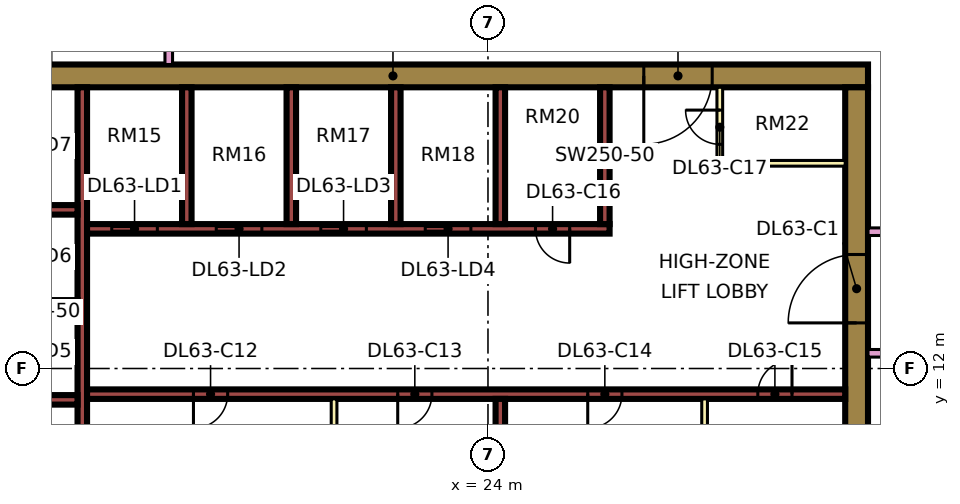
"""IFC4 building model, lengths in metres.
Left out: names, types, materials, properties, quantities, classifications, styles, units other than length and angle.
Written with IfcOpenShell. Run it as: python <this file> out.ifc"""

import sys

from ifc_helpers import new_model, si_unit, direction, frame, frame_2d, origin, place, context, subcontext, project, spatial, rectangle, extrude, element, fill, save


model = new_model("IFC4")
c1 = context("Model", 3, precision=1e-05, world=origin(), true_north=direction((0.0, 1.0)))
c2 = subcontext(c1, "Body", "Model", "MODEL_VIEW")
j1 = project(units=[si_unit("LENGTHUNIT", "METRE"), si_unit("PLANEANGLEUNIT", "RADIAN")], contexts=[c1])
p1 = place(None, origin())
s1 = spatial("IfcSite", under=j1, at=p1, CompositionType="ELEMENT")
p2 = place(p1, origin())
s2 = spatial("IfcBuilding", under=s1, at=p2, CompositionType="ELEMENT")
p3 = place(p2, frame((0.0, 0.0, 273.4)))
s3 = spatial("IfcBuildingStorey", under=s2, at=p3, CompositionType="ELEMENT", Elevation=273.4)
p4 = place(p3, frame((9.0, 19.7, 0.0), z_axis=(0.0, 0.0, 1.0), x_axis=(1.0, 0.0, 0.0)))
e1 = element("IfcWall", 1, at=p4, inside=s3, PredefinedType="SHEAR", context=c2, shape_type="SweptSolid", body=[
    extrude(rectangle(XDim=25.0, YDim=0.6, at=frame_2d((12.5, 0.0))), origin(), (0.0, 0.0, 1.0), 3.75),
])
p5 = place(p4, frame((19.1, 0.0, 0.0)))
e2 = element("IfcOpeningElement", 2, at=p5, cuts=e1, PredefinedType="OPENING", context=c2, shape_type="SweptSolid", body=[
    extrude(rectangle(XDim=1.8, YDim=2.4, at=frame_2d((0.9, 1.2))), frame((0.0, 0.31, 0.0), z_axis=(0.0, -1.0, 0.0), x_axis=(1.0, 0.0, 0.0)), (0.0, 0.0, 1.0), 0.62),
])
p6 = place(p3, frame((33.7, 7.6, 0.0), z_axis=(0.0, 0.0, 1.0), x_axis=(0.0, 1.0, 0.0)))
e3 = element("IfcWall", 3, at=p6, inside=s3, PredefinedType="SHEAR", context=c2, shape_type="SweptSolid", body=[
    extrude(rectangle(XDim=11.8, YDim=0.6, at=frame_2d((5.9, 0.0))), origin(), (0.0, 0.0, 1.0), 3.75),
])
p7 = place(p6, frame((5.6, 0.0, 0.0)))
e4 = element("IfcOpeningElement", 4, at=p7, cuts=e3, PredefinedType="OPENING", context=c2, shape_type="SweptSolid", body=[
    extrude(rectangle(XDim=1.8, YDim=2.4, at=frame_2d((0.9, 1.2))), frame((0.0, 0.31, 0.0), z_axis=(0.0, -1.0, 0.0), x_axis=(1.0, 0.0, 0.0)), (0.0, 0.0, 1.0), 0.62),
])
p8 = place(p3, frame((13.325, 7.6, 0.0), z_axis=(0.0, 0.0, 1.0), x_axis=(0.0, 1.0, 0.0)))
e5 = element("IfcWall", 5, at=p8, inside=s3, PredefinedType="SHEAR", context=c2, shape_type="SweptSolid", body=[
    extrude(rectangle(XDim=11.8, YDim=0.25, at=frame_2d((5.9, 0.0))), origin(), (0.0, 0.0, 1.0), 3.75),
])
p9 = place(p3, frame((13.45, 11.325, 0.0), z_axis=(0.0, 0.0, 1.0), x_axis=(1.0, 0.0, 0.0)))
e6 = element("IfcWall", 6, at=p9, inside=s3, PredefinedType="SHEAR", context=c2, shape_type="SweptSolid", body=[
    extrude(rectangle(XDim=19.95, YDim=0.25, at=frame_2d((9.975, 0.0))), origin(), (0.0, 0.0, 1.0), 3.75),
])
p10 = place(p9, frame((2.8, 0.0, 0.0)))
e7 = element("IfcOpeningElement", 7, at=p10, cuts=e6, PredefinedType="OPENING", context=c2, shape_type="SweptSolid", body=[
    extrude(rectangle(XDim=0.9, YDim=2.1, at=frame_2d((0.45, 1.05))), frame((0.0, 0.135, 0.0), z_axis=(0.0, -1.0, 0.0), x_axis=(1.0, 0.0, 0.0)), (0.0, 0.0, 1.0), 0.27),
])
p11 = place(p9, frame((8.175, 0.0, 0.0)))
e8 = element("IfcOpeningElement", 8, at=p11, cuts=e6, PredefinedType="OPENING", context=c2, shape_type="SweptSolid", body=[
    extrude(rectangle(XDim=0.9, YDim=2.1, at=frame_2d((0.45, 1.05))), frame((0.0, 0.135, 0.0), z_axis=(0.0, -1.0, 0.0), x_axis=(1.0, 0.0, 0.0)), (0.0, 0.0, 1.0), 0.27),
])
p12 = place(p9, frame((13.175, 0.0, 0.0)))
e9 = element("IfcOpeningElement", 9, at=p12, cuts=e6, PredefinedType="OPENING", context=c2, shape_type="SweptSolid", body=[
    extrude(rectangle(XDim=0.9, YDim=2.1, at=frame_2d((0.45, 1.05))), frame((0.0, 0.135, 0.0), z_axis=(0.0, -1.0, 0.0), x_axis=(1.0, 0.0, 0.0)), (0.0, 0.0, 1.0), 0.27),
])
p13 = place(p9, frame((17.65, 0.0, 0.0)))
e10 = element("IfcOpeningElement", 10, at=p13, cuts=e6, PredefinedType="OPENING", context=c2, shape_type="SweptSolid", body=[
    extrude(rectangle(XDim=0.9, YDim=2.1, at=frame_2d((0.45, 1.05))), frame((0.0, 0.135, 0.0), z_axis=(0.0, -1.0, 0.0), x_axis=(1.0, 0.0, 0.0)), (0.0, 0.0, 1.0), 0.27),
])
p14 = place(p3, frame((13.45, 15.675, 0.0), z_axis=(0.0, 0.0, 1.0), x_axis=(1.0, 0.0, 0.0)))
e11 = element("IfcWall", 11, at=p14, inside=s3, PredefinedType="SHEAR", context=c2, shape_type="SweptSolid", body=[
    extrude(rectangle(XDim=13.75, YDim=0.25, at=frame_2d((6.875, 0.0))), origin(), (0.0, 0.0, 1.0), 3.75),
])
p15 = place(p14, frame((0.65, 0.0, 0.0)))
e12 = element("IfcOpeningElement", 12, at=p15, cuts=e11, PredefinedType="OPENING", context=c2, shape_type="SweptSolid", body=[
    extrude(rectangle(XDim=1.2, YDim=2.2, at=frame_2d((0.6, 1.1))), frame((0.0, 0.135, 0.0), z_axis=(0.0, -1.0, 0.0), x_axis=(1.0, 0.0, 0.0)), (0.0, 0.0, 1.0), 0.27),
])
p16 = place(p14, frame((3.4, 0.0, 0.0)))
e13 = element("IfcOpeningElement", 13, at=p16, cuts=e11, PredefinedType="OPENING", context=c2, shape_type="SweptSolid", body=[
    extrude(rectangle(XDim=1.2, YDim=2.2, at=frame_2d((0.6, 1.1))), frame((0.0, 0.135, 0.0), z_axis=(0.0, -1.0, 0.0), x_axis=(1.0, 0.0, 0.0)), (0.0, 0.0, 1.0), 0.27),
])
p17 = place(p14, frame((6.15, 0.0, 0.0)))
e14 = element("IfcOpeningElement", 14, at=p17, cuts=e11, PredefinedType="OPENING", context=c2, shape_type="SweptSolid", body=[
    extrude(rectangle(XDim=1.2, YDim=2.2, at=frame_2d((0.6, 1.1))), frame((0.0, 0.135, 0.0), z_axis=(0.0, -1.0, 0.0), x_axis=(1.0, 0.0, 0.0)), (0.0, 0.0, 1.0), 0.27),
])
p18 = place(p14, frame((8.9, 0.0, 0.0)))
e15 = element("IfcOpeningElement", 15, at=p18, cuts=e11, PredefinedType="OPENING", context=c2, shape_type="SweptSolid", body=[
    extrude(rectangle(XDim=1.2, YDim=2.2, at=frame_2d((0.6, 1.1))), frame((0.0, 0.135, 0.0), z_axis=(0.0, -1.0, 0.0), x_axis=(1.0, 0.0, 0.0)), (0.0, 0.0, 1.0), 0.27),
])
p19 = place(p14, frame((11.8, 0.0, 0.0)))
e16 = element("IfcOpeningElement", 16, at=p19, cuts=e11, PredefinedType="OPENING", context=c2, shape_type="SweptSolid", body=[
    extrude(rectangle(XDim=0.9, YDim=2.1, at=frame_2d((0.45, 1.05))), frame((0.0, 0.135, 0.0), z_axis=(0.0, -1.0, 0.0), x_axis=(1.0, 0.0, 0.0)), (0.0, 0.0, 1.0), 0.27),
])
for number, where, z_axis, x_axis in (
    (17, (10.2, 11.175, 0.0), (0.0, 0.0, 1.0), (1.0, 0.0, 0.0)),
    (18, (10.2, 13.675, 0.0), (0.0, 0.0, 1.0), (1.0, 0.0, 0.0)),
    (19, (10.2, 16.175, 0.0), (0.0, 0.0, 1.0), (1.0, 0.0, 0.0)),
):
    element("IfcWall", number, at=place(p3, frame(where, z_axis=z_axis, x_axis=x_axis)), inside=s3, PredefinedType="SHEAR", context=c2, shape_type="SweptSolid", body=[
        extrude(rectangle(XDim=3.0, YDim=0.25, at=frame_2d((1.5, 0.0))), origin(), (0.0, 0.0, 1.0), 3.75),
    ])
for number, where, z_axis, x_axis in (
    (20, (24.325, 7.6, 0.0), (0.0, 0.0, 1.0), (0.0, 1.0, 0.0)),
    (21, (16.075, 15.8, 0.0), (0.0, 0.0, 1.0), (0.0, 1.0, 0.0)),
    (22, (18.825, 15.8, 0.0), (0.0, 0.0, 1.0), (0.0, 1.0, 0.0)),
    (23, (21.575, 15.8, 0.0), (0.0, 0.0, 1.0), (0.0, 1.0, 0.0)),
    (24, (24.325, 15.8, 0.0), (0.0, 0.0, 1.0), (0.0, 1.0, 0.0)),
    (25, (27.075, 15.8, 0.0), (0.0, 0.0, 1.0), (0.0, 1.0, 0.0)),
):
    element("IfcWall", number, at=place(p3, frame(where, z_axis=z_axis, x_axis=x_axis)), inside=s3, PredefinedType="SHEAR", context=c2, shape_type="SweptSolid", body=[
        extrude(rectangle(XDim=3.6, YDim=0.25, at=frame_2d((1.8, 0.0))), origin(), (0.0, 0.0, 1.0), 3.75),
    ])
p20 = place(p3, frame((-1.447, 12.553, 0.0), z_axis=(0.0, 0.0, 1.0), x_axis=(0.707106781187, -0.707106781187, 0.0)))
e26 = element("IfcWall", 26, at=p20, inside=s3, PredefinedType="SOLIDWALL", context=c2, shape_type="SweptSolid", body=[
    extrude(rectangle(XDim=19.799, YDim=0.15, at=frame_2d((9.899, 0.0))), origin(), (0.0, 0.0, 1.0), 3.35),
])
p21 = place(p20, frame((2.212, 0.0, 0.45)))
e27 = element("IfcOpeningElement", 27, at=p21, cuts=e26, PredefinedType="OPENING", context=c2, shape_type="SweptSolid", body=[
    extrude(rectangle(XDim=3.0, YDim=2.4, at=frame_2d((1.5, 1.2))), frame((0.0, 0.085, 0.0), z_axis=(0.0, -1.0, 0.0), x_axis=(1.0, 0.0, 0.0)), (0.0, 0.0, 1.0), 0.17),
])
p22 = place(p20, frame((10.216, 0.0, 0.45)))
e28 = element("IfcOpeningElement", 28, at=p22, cuts=e26, PredefinedType="OPENING", context=c2, shape_type="SweptSolid", body=[
    extrude(rectangle(XDim=3.0, YDim=2.4, at=frame_2d((1.5, 1.2))), frame((0.0, 0.085, 0.0), z_axis=(0.0, -1.0, 0.0), x_axis=(1.0, 0.0, 0.0)), (0.0, 0.0, 1.0), 0.17),
])
for number, where, z_axis, x_axis in (
    (29, (19.95, 7.6, 0.0), (0.0, 0.0, 1.0), (0.0, 1.0, 0.0)),
    (30, (29.7, 7.6, 0.0), (0.0, 0.0, 1.0), (0.0, 1.0, 0.0)),
):
    element("IfcWall", number, at=place(p3, frame(where, z_axis=z_axis, x_axis=x_axis)), inside=s3, PredefinedType="PARTITIONING", context=c2, shape_type="SweptSolid", body=[
        extrude(rectangle(XDim=3.6, YDim=0.15, at=frame_2d((1.8, 0.0))), origin(), (0.0, 0.0, 1.0), 3.35),
    ])
p23 = place(p3, frame((30.1, 17.4, 0.0), z_axis=(0.0, 0.0, 1.0), x_axis=(0.0, 1.0, 0.0)))
e31 = element("IfcWall", 31, at=p23, inside=s3, PredefinedType="PARTITIONING", context=c2, shape_type="SweptSolid", body=[
    extrude(rectangle(XDim=2.0, YDim=0.15, at=frame_2d((1.0, 0.0))), origin(), (0.0, 0.0, 1.0), 3.35),
])
p24 = place(p23, frame((0.5, 0.0, 0.0)))
e32 = element("IfcOpeningElement", 32, at=p24, cuts=e31, PredefinedType="OPENING", context=c2, shape_type="SweptSolid", body=[
    extrude(rectangle(XDim=0.9, YDim=2.1, at=frame_2d((0.45, 1.05))), frame((0.0, 0.085, 0.0), z_axis=(0.0, -1.0, 0.0), x_axis=(1.0, 0.0, 0.0)), (0.0, 0.0, 1.0), 0.17),
])
p25 = place(p3, frame((30.1, 17.4, 0.0), z_axis=(0.0, 0.0, 1.0), x_axis=(1.0, 0.0, 0.0)))
e33 = element("IfcWall", 33, at=p25, inside=s3, PredefinedType="PARTITIONING", context=c2, shape_type="SweptSolid", body=[
    extrude(rectangle(XDim=3.3, YDim=0.15, at=frame_2d((1.65, 0.0))), origin(), (0.0, 0.0, 1.0), 3.35),
])
p26 = place(p3, frame((15.6, 20.0, 0.0), z_axis=(0.0, 0.0, 1.0), x_axis=(0.0, 1.0, 0.0)))
e34 = element("IfcWall", 34, at=p26, inside=s3, PredefinedType="PARTITIONING", context=c2, shape_type="SweptSolid", body=[
    extrude(rectangle(XDim=27.775, YDim=0.2, at=frame_2d((13.887, 0.0))), origin(), (0.0, 0.0, 1.0), 3.35),
])
p27 = place(p26, frame((5.95, 0.0, 0.0)))
e35 = element("IfcOpeningElement", 35, at=p27, cuts=e34, PredefinedType="OPENING", context=c2, shape_type="SweptSolid", body=[
    extrude(rectangle(XDim=1.0, YDim=2.1, at=frame_2d((0.5, 1.05))), frame((0.0, 0.11, 0.0), z_axis=(0.0, -1.0, 0.0), x_axis=(1.0, 0.0, 0.0)), (0.0, 0.0, 1.0), 0.22),
])
p28 = place(p26, frame((12.0, 0.0, 0.0)))
e36 = element("IfcOpeningElement", 36, at=p28, cuts=e34, PredefinedType="OPENING", context=c2, shape_type="SweptSolid", body=[
    extrude(rectangle(XDim=1.0, YDim=2.1, at=frame_2d((0.5, 1.05))), frame((0.0, 0.11, 0.0), z_axis=(0.0, -1.0, 0.0), x_axis=(1.0, 0.0, 0.0)), (0.0, 0.0, 1.0), 0.22),
])
p29 = place(p26, frame((16.9, 0.0, 0.0)))
e37 = element("IfcOpeningElement", 37, at=p29, cuts=e34, PredefinedType="OPENING", context=c2, shape_type="SweptSolid", body=[
    extrude(rectangle(XDim=1.0, YDim=2.1, at=frame_2d((0.5, 1.05))), frame((0.0, 0.11, 0.0), z_axis=(0.0, -1.0, 0.0), x_axis=(1.0, 0.0, 0.0)), (0.0, 0.0, 1.0), 0.22),
])
p30 = place(p26, frame((1.15, 0.0, 0.0)))
e38 = element("IfcOpeningElement", 38, at=p30, cuts=e34, PredefinedType="OPENING", context=c2, shape_type="SweptSolid", body=[
    extrude(rectangle(XDim=1.8, YDim=2.1, at=frame_2d((0.9, 1.05))), frame((0.0, 0.11, 0.0), z_axis=(0.0, -1.0, 0.0), x_axis=(1.0, 0.0, 0.0)), (0.0, 0.0, 1.0), 0.22),
])
p31 = place(p26, frame((25.9, 0.0, 0.0)))
e39 = element("IfcOpeningElement", 39, at=p31, cuts=e34, PredefinedType="OPENING", context=c2, shape_type="SweptSolid", body=[
    extrude(rectangle(XDim=1.0, YDim=2.1, at=frame_2d((0.5, 1.05))), frame((0.0, 0.11, 0.0), z_axis=(0.0, -1.0, 0.0), x_axis=(1.0, 0.0, 0.0)), (0.0, 0.0, 1.0), 0.22),
])
p32 = place(p3, frame((34.0, 12.4, 0.0), z_axis=(0.0, 0.0, 1.0), x_axis=(1.0, 0.0, 0.0)))
e40 = element("IfcWall", 40, at=p32, inside=s3, PredefinedType="PARTITIONING", context=c2, shape_type="SweptSolid", body=[
    extrude(rectangle(XDim=2.401, YDim=0.2, at=frame_2d((1.2, 0.0))), origin(), (0.0, 0.0, 1.0), 3.35),
])
p33 = place(p3, frame((34.0, 15.6, 0.0), z_axis=(0.0, 0.0, 1.0), x_axis=(1.0, 0.0, 0.0)))
e41 = element("IfcWall", 41, at=p33, inside=s3, PredefinedType="PARTITIONING", context=c2, shape_type="SweptSolid", body=[
    extrude(rectangle(XDim=10.35, YDim=0.2, at=frame_2d((5.175, 0.0))), origin(), (0.0, 0.0, 1.0), 3.35),
])
p34 = place(p33, frame((5.6, 0.0, 0.0)))
e42 = element("IfcOpeningElement", 42, at=p34, cuts=e41, PredefinedType="OPENING", context=c2, shape_type="SweptSolid", body=[
    extrude(rectangle(XDim=1.0, YDim=2.1, at=frame_2d((0.5, 1.05))), frame((0.0, 0.11, 0.0), z_axis=(0.0, -1.0, 0.0), x_axis=(1.0, 0.0, 0.0)), (0.0, 0.0, 1.0), 0.22),
])
p35 = place(p33, frame((0.45, 0.0, 0.0)))
e43 = element("IfcOpeningElement", 43, at=p35, cuts=e41, PredefinedType="OPENING", context=c2, shape_type="SweptSolid", body=[
    extrude(rectangle(XDim=1.2, YDim=2.1, at=frame_2d((0.6, 1.05))), frame((0.0, 0.11, 0.0), z_axis=(0.0, -1.0, 0.0), x_axis=(1.0, 0.0, 0.0)), (0.0, 0.0, 1.0), 0.22),
])
p36 = place(p15, origin())
e44 = element("IfcDoor", 44, at=p36, inside=s3, OperationType="DOUBLE_DOOR_SLIDING", PredefinedType="DOOR", context=c2, shape_type="SweptSolid", body=[
    extrude(rectangle(XDim=1.2, YDim=2.2, at=frame_2d((0.6, 1.1))), frame((0.0, 0.025, 0.0), z_axis=(0.0, -1.0, 0.0), x_axis=(1.0, 0.0, 0.0)), (0.0, 0.0, 1.0), 0.05),
])
fill(e12, e44)
p37 = place(p16, origin())
e45 = element("IfcDoor", 45, at=p37, inside=s3, OperationType="DOUBLE_DOOR_SLIDING", PredefinedType="DOOR", context=c2, shape_type="SweptSolid", body=[
    extrude(rectangle(XDim=1.2, YDim=2.2, at=frame_2d((0.6, 1.1))), frame((0.0, 0.025, 0.0), z_axis=(0.0, -1.0, 0.0), x_axis=(1.0, 0.0, 0.0)), (0.0, 0.0, 1.0), 0.05),
])
fill(e13, e45)
p38 = place(p17, origin())
e46 = element("IfcDoor", 46, at=p38, inside=s3, OperationType="DOUBLE_DOOR_SLIDING", PredefinedType="DOOR", context=c2, shape_type="SweptSolid", body=[
    extrude(rectangle(XDim=1.2, YDim=2.2, at=frame_2d((0.6, 1.1))), frame((0.0, 0.025, 0.0), z_axis=(0.0, -1.0, 0.0), x_axis=(1.0, 0.0, 0.0)), (0.0, 0.0, 1.0), 0.05),
])
fill(e14, e46)
p39 = place(p18, origin())
e47 = element("IfcDoor", 47, at=p39, inside=s3, OperationType="DOUBLE_DOOR_SLIDING", PredefinedType="DOOR", context=c2, shape_type="SweptSolid", body=[
    extrude(rectangle(XDim=1.2, YDim=2.2, at=frame_2d((0.6, 1.1))), frame((0.0, 0.025, 0.0), z_axis=(0.0, -1.0, 0.0), x_axis=(1.0, 0.0, 0.0)), (0.0, 0.0, 1.0), 0.05),
])
fill(e15, e47)
p40 = place(p7, origin())
e48 = element("IfcDoor", 48, at=p40, inside=s3, OperationType="DOUBLE_DOOR_SINGLE_SWING", PredefinedType="DOOR", context=c2, shape_type="SweptSolid", body=[
    extrude(rectangle(XDim=1.8, YDim=2.4, at=frame_2d((0.9, 1.2))), frame((0.0, 0.025, 0.0), z_axis=(0.0, -1.0, 0.0), x_axis=(1.0, 0.0, 0.0)), (0.0, 0.0, 1.0), 0.05),
])
fill(e4, e48)
p41 = place(p5, frame((1.8, 0.0, 0.0), z_axis=(0.0, 0.0, 1.0), x_axis=(-1.0, 0.0, 0.0)))
e49 = element("IfcDoor", 49, at=p41, inside=s3, OperationType="DOUBLE_DOOR_SINGLE_SWING", PredefinedType="DOOR", context=c2, shape_type="SweptSolid", body=[
    extrude(rectangle(XDim=1.8, YDim=2.4, at=frame_2d((0.9, 1.2))), frame((0.0, 0.025, 0.0), z_axis=(0.0, -1.0, 0.0), x_axis=(1.0, 0.0, 0.0)), (0.0, 0.0, 1.0), 0.05),
])
fill(e2, e49)
p42 = place(p10, frame((0.9, 0.0, 0.0), z_axis=(0.0, 0.0, 1.0), x_axis=(-1.0, 0.0, 0.0)))
e50 = element("IfcDoor", 50, at=p42, inside=s3, OperationType="SINGLE_SWING_LEFT", PredefinedType="DOOR", context=c2, shape_type="SweptSolid", body=[
    extrude(rectangle(XDim=0.9, YDim=2.1, at=frame_2d((0.45, 1.05))), frame((0.0, 0.025, 0.0), z_axis=(0.0, -1.0, 0.0), x_axis=(1.0, 0.0, 0.0)), (0.0, 0.0, 1.0), 0.05),
])
fill(e7, e50)
p43 = place(p11, frame((0.9, 0.0, 0.0), z_axis=(0.0, 0.0, 1.0), x_axis=(-1.0, 0.0, 0.0)))
e51 = element("IfcDoor", 51, at=p43, inside=s3, OperationType="SINGLE_SWING_LEFT", PredefinedType="DOOR", context=c2, shape_type="SweptSolid", body=[
    extrude(rectangle(XDim=0.9, YDim=2.1, at=frame_2d((0.45, 1.05))), frame((0.0, 0.025, 0.0), z_axis=(0.0, -1.0, 0.0), x_axis=(1.0, 0.0, 0.0)), (0.0, 0.0, 1.0), 0.05),
])
fill(e8, e51)
p44 = place(p12, frame((0.9, 0.0, 0.0), z_axis=(0.0, 0.0, 1.0), x_axis=(-1.0, 0.0, 0.0)))
e52 = element("IfcDoor", 52, at=p44, inside=s3, OperationType="SINGLE_SWING_LEFT", PredefinedType="DOOR", context=c2, shape_type="SweptSolid", body=[
    extrude(rectangle(XDim=0.9, YDim=2.1, at=frame_2d((0.45, 1.05))), frame((0.0, 0.025, 0.0), z_axis=(0.0, -1.0, 0.0), x_axis=(1.0, 0.0, 0.0)), (0.0, 0.0, 1.0), 0.05),
])
fill(e9, e52)
p45 = place(p13, frame((0.9, 0.0, 0.0), z_axis=(0.0, 0.0, 1.0), x_axis=(-1.0, 0.0, 0.0)))
e53 = element("IfcDoor", 53, at=p45, inside=s3, OperationType="SINGLE_SWING_RIGHT", PredefinedType="DOOR", context=c2, shape_type="SweptSolid", body=[
    extrude(rectangle(XDim=0.9, YDim=2.1, at=frame_2d((0.45, 1.05))), frame((0.0, 0.025, 0.0), z_axis=(0.0, -1.0, 0.0), x_axis=(1.0, 0.0, 0.0)), (0.0, 0.0, 1.0), 0.05),
])
fill(e10, e53)
p46 = place(p19, origin())
e54 = element("IfcDoor", 54, at=p46, inside=s3, OperationType="SINGLE_SWING_RIGHT", PredefinedType="DOOR", context=c2, shape_type="SweptSolid", body=[
    extrude(rectangle(XDim=0.9, YDim=2.1, at=frame_2d((0.45, 1.05))), frame((0.0, 0.025, 0.0), z_axis=(0.0, -1.0, 0.0), x_axis=(1.0, 0.0, 0.0)), (0.0, 0.0, 1.0), 0.05),
])
fill(e16, e54)
p47 = place(p24, frame((0.9, 0.0, 0.0), z_axis=(0.0, 0.0, 1.0), x_axis=(-1.0, 0.0, 0.0)))
e55 = element("IfcDoor", 55, at=p47, inside=s3, OperationType="SINGLE_SWING_RIGHT", PredefinedType="DOOR", context=c2, shape_type="SweptSolid", body=[
    extrude(rectangle(XDim=0.9, YDim=2.1, at=frame_2d((0.45, 1.05))), frame((0.0, 0.025, 0.0), z_axis=(0.0, -1.0, 0.0), x_axis=(1.0, 0.0, 0.0)), (0.0, 0.0, 1.0), 0.05),
])
fill(e32, e55)
save(model, sys.argv[1])
